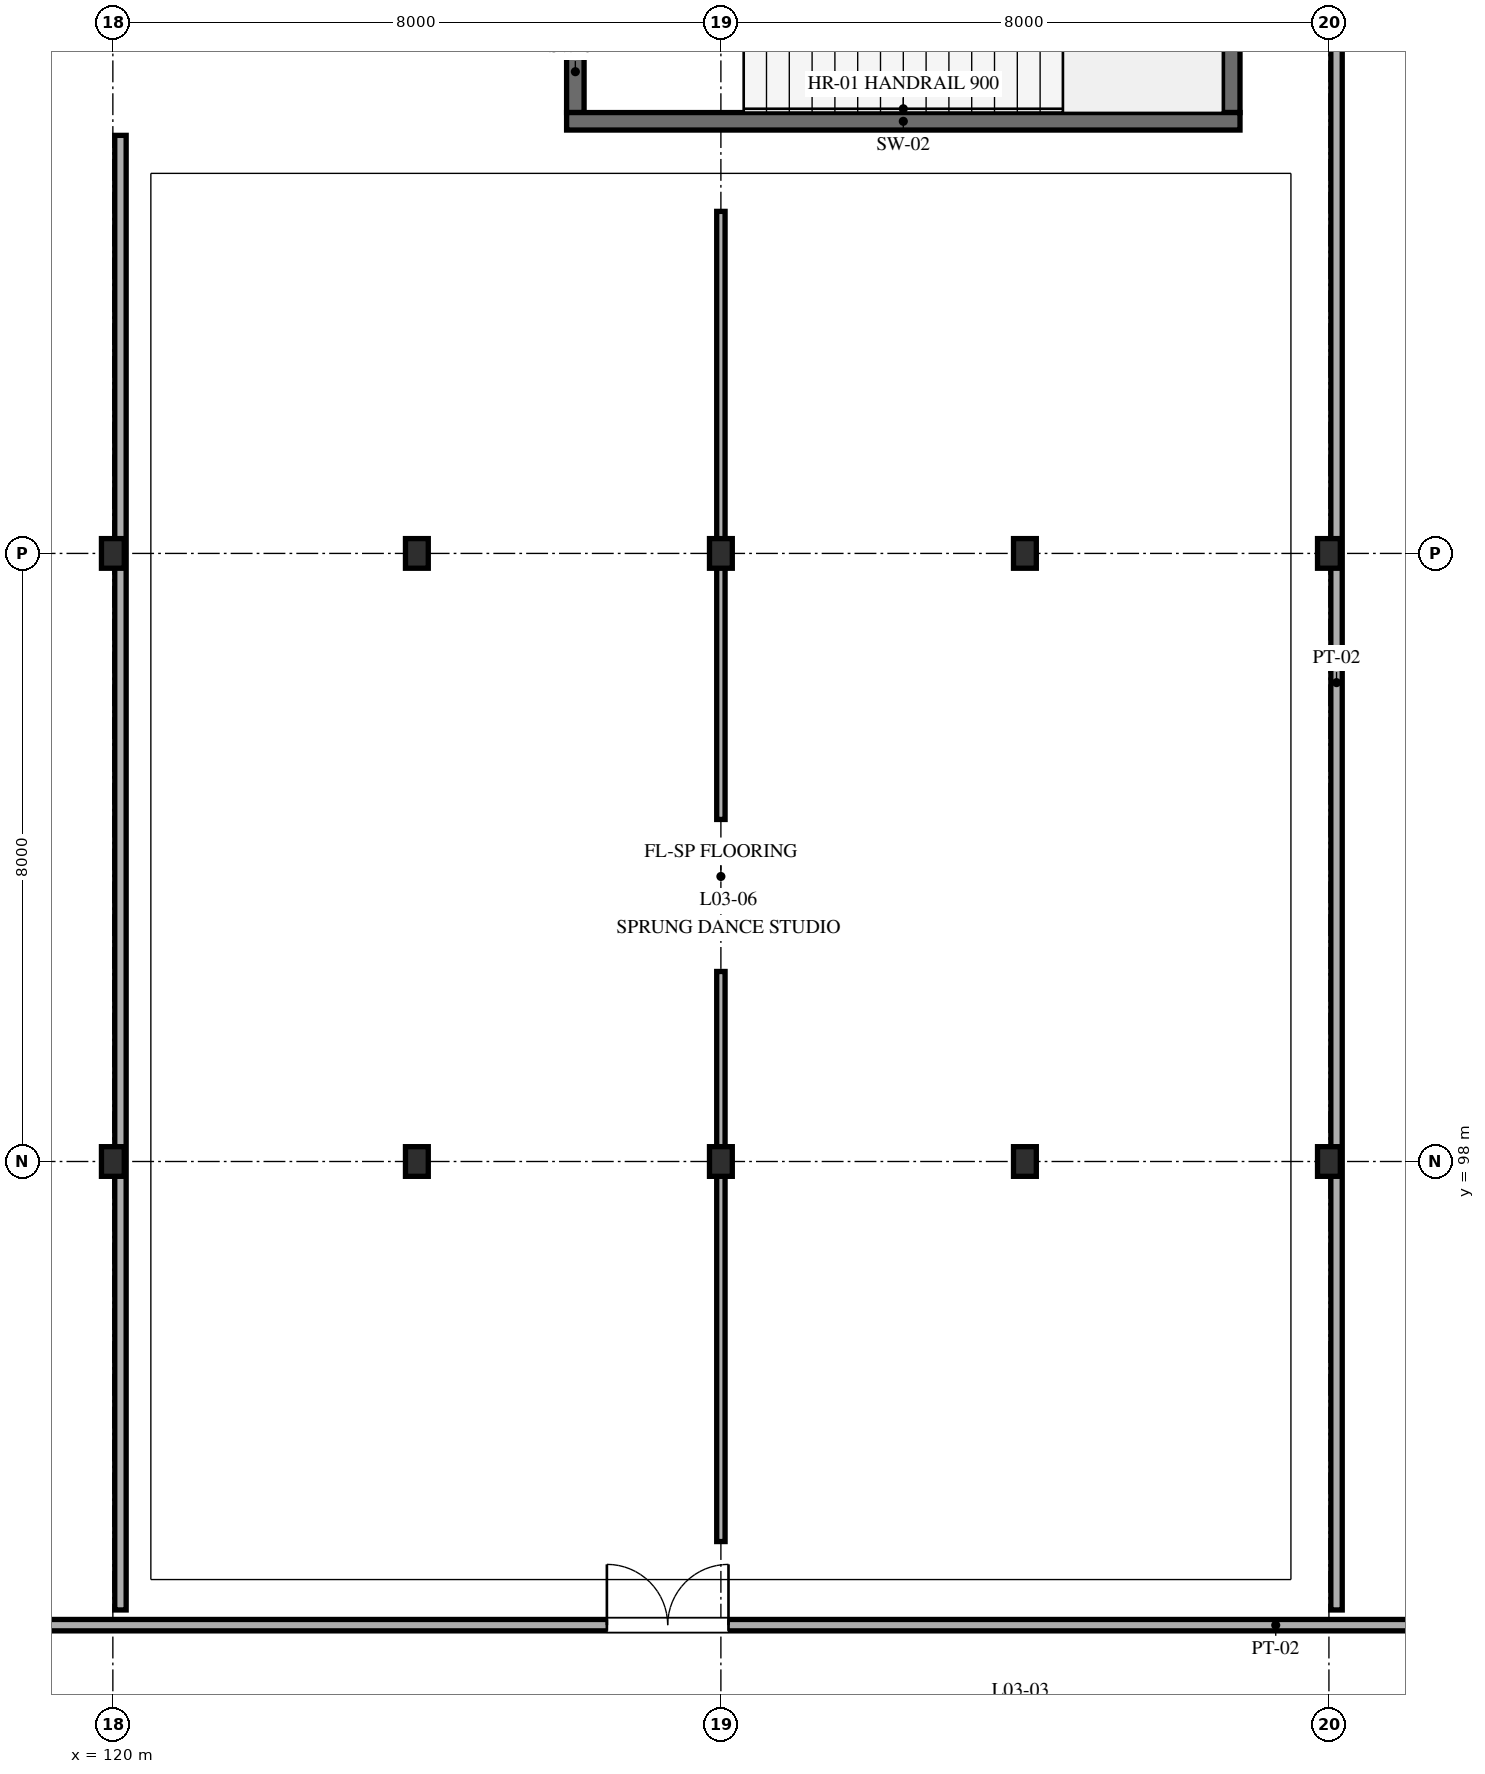
"""IFC4 building model, lengths in metres.
Left out: names, types, materials, properties, quantities, classifications, styles, units other than length and angle.
Written with IfcOpenShell. Run it as: python <this file> out.ifc"""

import sys

from ifc_helpers import new_model, si_unit, direction, frame, frame_2d, origin, origin_2d, place, context, subcontext, project, spatial, rectangle, i_section, extrude, element, fill, save


model = new_model("IFC4")
c1 = context("Model", 3, precision=1e-05, world=origin(), true_north=direction((0.0, 1.0)))
c2 = subcontext(c1, "Body", "Model", "MODEL_VIEW")
j1 = project(units=[si_unit("LENGTHUNIT", "METRE"), si_unit("PLANEANGLEUNIT", "RADIAN")], contexts=[c1])
p1 = place(None, origin())
s1 = spatial("IfcSite", under=j1, at=p1, CompositionType="ELEMENT")
p2 = place(p1, origin())
s2 = spatial("IfcBuilding", under=s1, at=p2, CompositionType="ELEMENT")
p3 = place(p2, frame((0.0, 0.0, 14.0)))
s3 = spatial("IfcBuildingStorey", under=s2, at=p3, CompositionType="ELEMENT", Elevation=14.0)
for number, where, z_axis, x_axis in (
    (1, (120.0, 98.0, 0.0), (0.0, 0.0, 1.0), (1.0, 0.0, 0.0)),
    (2, (120.0, 106.0, 0.0), (0.0, 0.0, 1.0), (1.0, 0.0, 0.0)),
    (3, (124.0, 98.0, 0.0), (0.0, 0.0, 1.0), (1.0, 0.0, 0.0)),
    (4, (124.0, 106.0, 0.0), (0.0, 0.0, 1.0), (1.0, 0.0, 0.0)),
    (5, (128.0, 98.0, 0.0), (0.0, 0.0, 1.0), (1.0, 0.0, 0.0)),
    (6, (128.0, 106.0, 0.0), (0.0, 0.0, 1.0), (1.0, 0.0, 0.0)),
    (7, (132.0, 98.0, 0.0), (0.0, 0.0, 1.0), (1.0, 0.0, 0.0)),
    (8, (132.0, 106.0, 0.0), (0.0, 0.0, 1.0), (1.0, 0.0, 0.0)),
    (9, (136.0, 98.0, 0.0), (0.0, 0.0, 1.0), (1.0, 0.0, 0.0)),
    (10, (136.0, 106.0, 0.0), (0.0, 0.0, 1.0), (1.0, 0.0, 0.0)),
):
    element("IfcColumn", number, at=place(p3, frame(where, z_axis=z_axis, x_axis=x_axis)), inside=s3, PredefinedType="COLUMN", context=c2, shape_type="SweptSolid", body=[
        extrude(i_section(OverallWidth=0.3, OverallDepth=0.39, WebThickness=0.011, FlangeThickness=0.019, FilletRadius=0.027, at=origin_2d()), origin(), (0.0, 0.0, 1.0), 4.6),
    ])
p4 = place(p3, frame((126.085, 111.8, 0.0), z_axis=(0.0, 0.0, 1.0), x_axis=(0.0, 1.0, 0.0)))
e11 = element("IfcWall", 11, at=p4, inside=s3, PredefinedType="SHEAR", context=c2, shape_type="SweptSolid", body=[
    extrude(rectangle(XDim=4.3, YDim=0.23, at=frame_2d((2.15, 0.0))), origin(), (0.0, 0.0, 1.0), 4.6),
])
p5 = place(p4, frame((1.425, 0.0, 0.0)))
e12 = element("IfcOpeningElement", 12, at=p5, cuts=e11, PredefinedType="OPENING", context=c2, shape_type="SweptSolid", body=[
    extrude(rectangle(XDim=1.45, YDim=2.2, at=frame_2d((0.725, 1.1))), frame((0.0, 0.125, 0.0), z_axis=(0.0, -1.0, 0.0), x_axis=(1.0, 0.0, 0.0)), (0.0, 0.0, 1.0), 0.25),
])
p6 = place(p3, frame((134.715, 116.1, 0.0), z_axis=(0.0, 0.0, 1.0), x_axis=(0.0, -1.0, 0.0)))
e13 = element("IfcWall", 13, at=p6, inside=s3, PredefinedType="SHEAR", context=c2, shape_type="SweptSolid", body=[
    extrude(rectangle(XDim=4.3, YDim=0.23, at=frame_2d((2.15, 0.0))), origin(), (0.0, 0.0, 1.0), 4.6),
])
p7 = place(p3, frame((125.97, 111.685, 0.0), z_axis=(0.0, 0.0, 1.0), x_axis=(1.0, 0.0, 0.0)))
e14 = element("IfcWall", 14, at=p7, inside=s3, PredefinedType="SHEAR", context=c2, shape_type="SweptSolid", body=[
    extrude(rectangle(XDim=8.86, YDim=0.23, at=frame_2d((4.43, 0.0))), origin(), (0.0, 0.0, 1.0), 4.6),
])
p8 = place(p3, frame((104.5, 91.9, 0.0), z_axis=(0.0, 0.0, 1.0), x_axis=(1.0, 0.0, 0.0)))
e15 = element("IfcWall", 15, at=p8, inside=s3, PredefinedType="PARTITIONING", context=c2, shape_type="SweptSolid", body=[
    extrude(rectangle(XDim=47.0, YDim=0.15, at=frame_2d((23.5, 0.0))), origin(), (0.0, 0.0, 1.0), 3.85),
])
p9 = place(p8, frame((2.5, 0.0, 0.0)))
e16 = element("IfcOpeningElement", 16, at=p9, cuts=e15, PredefinedType="OPENING", context=c2, shape_type="SweptSolid", body=[
    extrude(rectangle(XDim=1.1, YDim=2.2, at=frame_2d((0.55, 1.1))), frame((0.0, 0.085, 0.0), z_axis=(0.0, -1.0, 0.0), x_axis=(1.0, 0.0, 0.0)), (0.0, 0.0, 1.0), 0.17),
])
p10 = place(p8, frame((9.5, 0.0, 0.0)))
e17 = element("IfcOpeningElement", 17, at=p10, cuts=e15, PredefinedType="OPENING", context=c2, shape_type="SweptSolid", body=[
    extrude(rectangle(XDim=1.05, YDim=2.15, at=frame_2d((0.525, 1.075))), frame((0.0, 0.085, 0.0), z_axis=(0.0, -1.0, 0.0), x_axis=(1.0, 0.0, 0.0)), (0.0, 0.0, 1.0), 0.17),
])
p11 = place(p8, frame((12.5, 0.0, 0.0)))
e18 = element("IfcOpeningElement", 18, at=p11, cuts=e15, PredefinedType="OPENING", context=c2, shape_type="SweptSolid", body=[
    extrude(rectangle(XDim=1.6, YDim=2.2, at=frame_2d((0.8, 1.1))), frame((0.0, 0.085, 0.0), z_axis=(0.0, -1.0, 0.0), x_axis=(1.0, 0.0, 0.0)), (0.0, 0.0, 1.0), 0.17),
])
p12 = place(p8, frame((22.0, 0.0, 0.0)))
e19 = element("IfcOpeningElement", 19, at=p12, cuts=e15, PredefinedType="OPENING", context=c2, shape_type="SweptSolid", body=[
    extrude(rectangle(XDim=1.6, YDim=2.2, at=frame_2d((0.8, 1.1))), frame((0.0, 0.085, 0.0), z_axis=(0.0, -1.0, 0.0), x_axis=(1.0, 0.0, 0.0)), (0.0, 0.0, 1.0), 0.17),
])
p13 = place(p8, frame((38.0, 0.0, 0.0)))
e20 = element("IfcOpeningElement", 20, at=p13, cuts=e15, PredefinedType="OPENING", context=c2, shape_type="SweptSolid", body=[
    extrude(rectangle(XDim=1.6, YDim=2.2, at=frame_2d((0.8, 1.1))), frame((0.0, 0.085, 0.0), z_axis=(0.0, -1.0, 0.0), x_axis=(1.0, 0.0, 0.0)), (0.0, 0.0, 1.0), 0.17),
])
p14 = place(p3, frame((120.1, 92.1, 0.0), z_axis=(0.0, 0.0, 1.0), x_axis=(0.0, 1.0, 0.0)))
e21 = element("IfcWall", 21, at=p14, inside=s3, PredefinedType="PARTITIONING", context=c2, shape_type="SweptSolid", body=[
    extrude(rectangle(XDim=19.4, YDim=0.15, at=frame_2d((9.7, 0.0))), origin(), (0.0, 0.0, 1.0), 3.85),
])
p15 = place(p3, frame((136.1, 92.1, 0.0), z_axis=(0.0, 0.0, 1.0), x_axis=(0.0, 1.0, 0.0)))
e22 = element("IfcWall", 22, at=p15, inside=s3, PredefinedType="PARTITIONING", context=c2, shape_type="SweptSolid", body=[
    extrude(rectangle(XDim=24.4, YDim=0.15, at=frame_2d((12.2, 0.0))), origin(), (0.0, 0.0, 1.0), 3.85),
])
p16 = place(p3, frame((128.0, 93.0, 0.0), z_axis=(0.0, 0.0, 1.0), x_axis=(0.0, 1.0, 0.0)))
e23 = element("IfcWall", 23, at=p16, inside=s3, PredefinedType="MOVABLE", context=c2, shape_type="SweptSolid", body=[
    extrude(rectangle(XDim=7.5, YDim=0.11, at=frame_2d((3.75, 0.0))), origin(), (0.0, 0.0, 1.0), 3.7),
])
p17 = place(p3, frame((128.0, 102.5, 0.0), z_axis=(0.0, 0.0, 1.0), x_axis=(0.0, 1.0, 0.0)))
e24 = element("IfcWall", 24, at=p17, inside=s3, PredefinedType="MOVABLE", context=c2, shape_type="SweptSolid", body=[
    extrude(rectangle(XDim=8.0, YDim=0.11, at=frame_2d((4.0, 0.0))), origin(), (0.0, 0.0, 1.0), 3.7),
])
p18 = place(p12, origin())
e25 = element("IfcDoor", 25, at=p18, inside=s3, OperationType="DOUBLE_DOOR_SINGLE_SWING", PredefinedType="DOOR", context=c2, shape_type="SweptSolid", body=[
    extrude(rectangle(XDim=1.6, YDim=2.2, at=frame_2d((0.8, 1.1))), frame((0.0, 0.025, 0.0), z_axis=(0.0, -1.0, 0.0), x_axis=(1.0, 0.0, 0.0)), (0.0, 0.0, 1.0), 0.05),
])
fill(e19, e25)
save(model, sys.argv[1])
